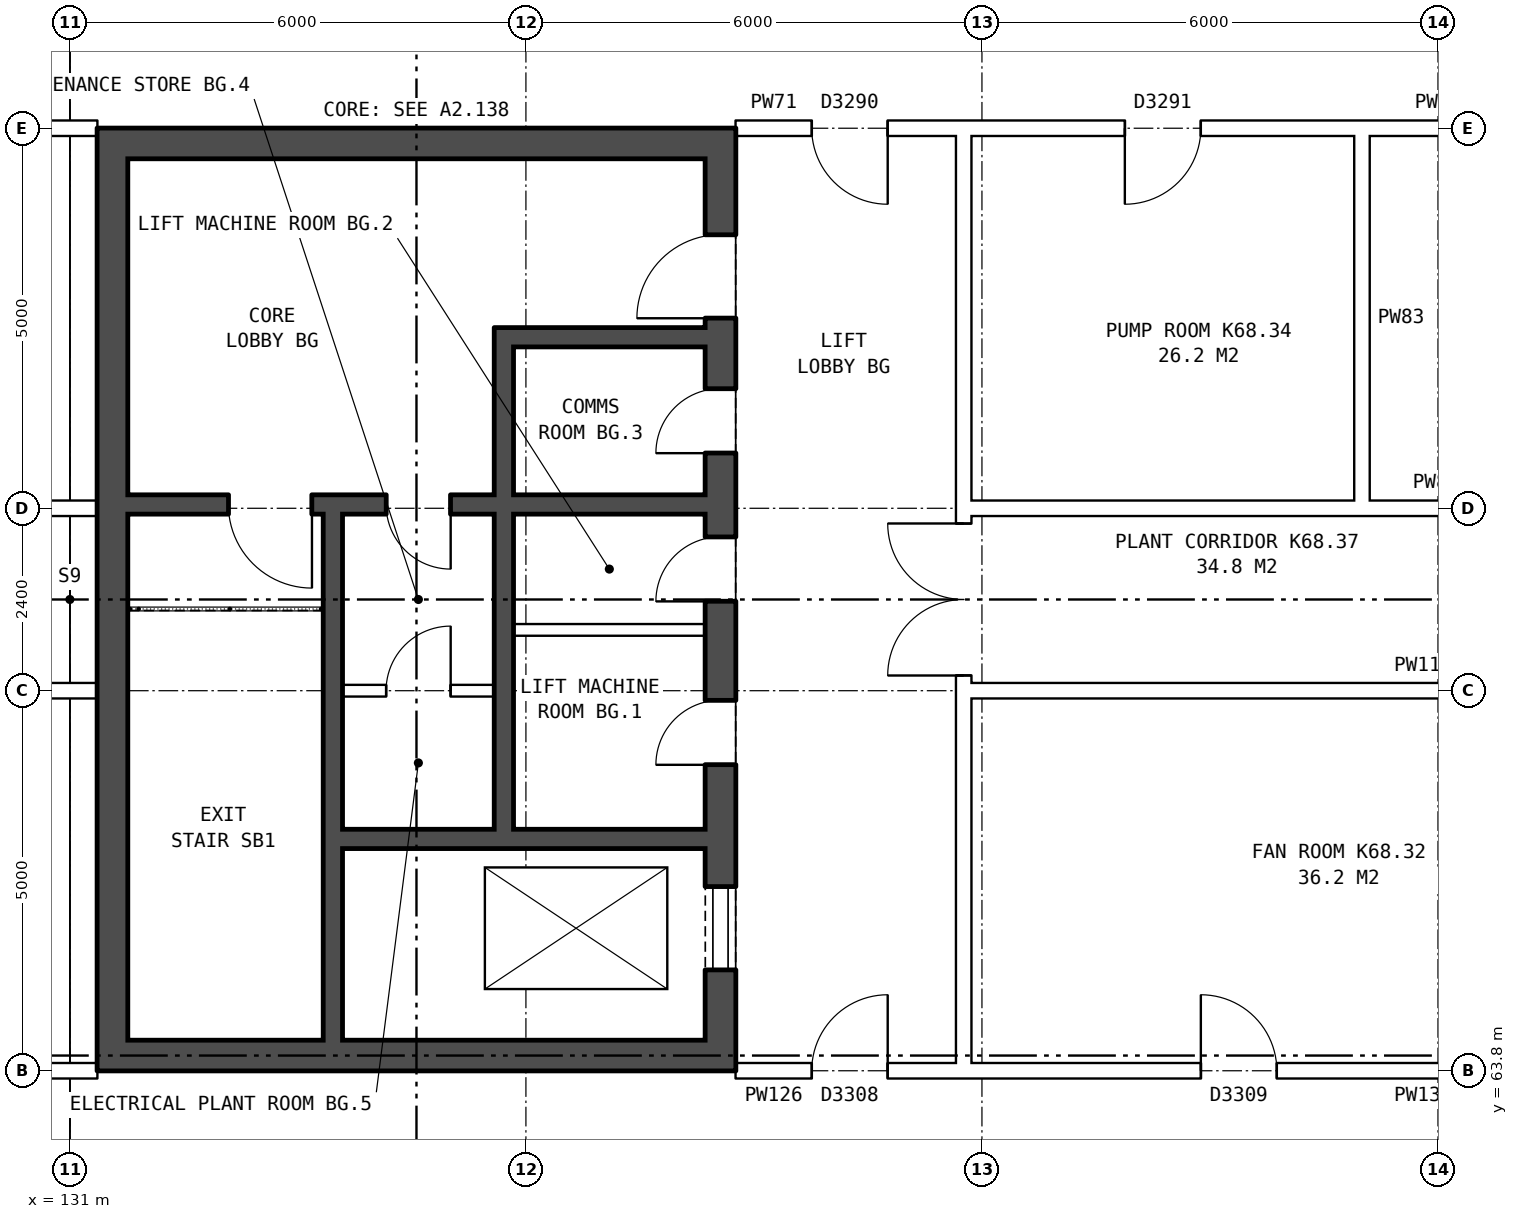
"""IFC4 building model, lengths in metres.
Left out: names, types, materials, properties, quantities, classifications, styles, units other than length and angle.
Written with IfcOpenShell. Run it as: python <this file> out.ifc"""

import sys

from ifc_helpers import new_model, si_unit, direction, frame, frame_2d, origin, place, context, subcontext, project, spatial, rectangle, extrude, element, fill, save


model = new_model("IFC4")
c1 = context("Model", 3, precision=1e-05, world=origin(), true_north=direction((0.0, 1.0)))
c2 = subcontext(c1, "Body", "Model", "MODEL_VIEW")
j1 = project(units=[si_unit("LENGTHUNIT", "METRE"), si_unit("PLANEANGLEUNIT", "RADIAN")], contexts=[c1])
p1 = place(None, origin())
s1 = spatial("IfcSite", under=j1, at=p1, CompositionType="ELEMENT")
p2 = place(p1, origin())
s2 = spatial("IfcBuilding", under=s1, at=p2, CompositionType="ELEMENT")
p3 = place(p2, frame((0.0, 0.0, 243.9)))
s3 = spatial("IfcBuildingStorey", under=s2, at=p3, CompositionType="ELEMENT", Elevation=243.9)
p4 = place(p3, frame((139.56, 63.8, 0.0), z_axis=(0.0, 0.0, 1.0), x_axis=(0.0, 1.0, 0.0)))
e1 = element("IfcWall", 1, at=p4, inside=s3, PredefinedType="SHEAR", context=c2, shape_type="SweptSolid", body=[
    extrude(rectangle(XDim=12.4, YDim=0.4, at=frame_2d((6.2, 0.0))), origin(), (0.0, 0.0, 1.0), 3.3),
])
p5 = place(p4, frame((1.325, 0.0, 0.0)))
e2 = element("IfcOpeningElement", 2, at=p5, cuts=e1, PredefinedType="OPENING", context=c2, shape_type="SweptSolid", body=[
    extrude(rectangle(XDim=1.1, YDim=2.1, at=frame_2d((0.55, 1.05))), frame((0.0, 0.21, 0.0), z_axis=(0.0, -1.0, 0.0), x_axis=(1.0, 0.0, 0.0)), (0.0, 0.0, 1.0), 0.42),
])
p6 = place(p4, frame((4.025, 0.0, 0.0)))
e3 = element("IfcOpeningElement", 3, at=p6, cuts=e1, PredefinedType="OPENING", context=c2, shape_type="SweptSolid", body=[
    extrude(rectangle(XDim=0.85, YDim=2.1, at=frame_2d((0.425, 1.05))), frame((0.0, 0.21, 0.0), z_axis=(0.0, -1.0, 0.0), x_axis=(1.0, 0.0, 0.0)), (0.0, 0.0, 1.0), 0.42),
])
p7 = place(p4, frame((6.175, 0.0, 0.0)))
e4 = element("IfcOpeningElement", 4, at=p7, cuts=e1, PredefinedType="OPENING", context=c2, shape_type="SweptSolid", body=[
    extrude(rectangle(XDim=0.85, YDim=2.1, at=frame_2d((0.425, 1.05))), frame((0.0, 0.21, 0.0), z_axis=(0.0, -1.0, 0.0), x_axis=(1.0, 0.0, 0.0)), (0.0, 0.0, 1.0), 0.42),
])
p8 = place(p4, frame((9.9, 0.0, 0.0)))
e5 = element("IfcOpeningElement", 5, at=p8, cuts=e1, PredefinedType="OPENING", context=c2, shape_type="SweptSolid", body=[
    extrude(rectangle(XDim=1.1, YDim=2.1, at=frame_2d((0.55, 1.05))), frame((0.0, 0.21, 0.0), z_axis=(0.0, -1.0, 0.0), x_axis=(1.0, 0.0, 0.0)), (0.0, 0.0, 1.0), 0.42),
])
p9 = place(p4, frame((8.125, 0.0, 0.0)))
e6 = element("IfcOpeningElement", 6, at=p9, cuts=e1, PredefinedType="OPENING", context=c2, shape_type="SweptSolid", body=[
    extrude(rectangle(XDim=0.85, YDim=2.1, at=frame_2d((0.425, 1.05))), frame((0.0, 0.21, 0.0), z_axis=(0.0, -1.0, 0.0), x_axis=(1.0, 0.0, 0.0)), (0.0, 0.0, 1.0), 0.42),
])
p10 = place(p3, frame((131.56, 63.8, 0.0), z_axis=(0.0, 0.0, 1.0), x_axis=(0.0, 1.0, 0.0)))
e7 = element("IfcWall", 7, at=p10, inside=s3, PredefinedType="SHEAR", context=c2, shape_type="SweptSolid", body=[
    extrude(rectangle(XDim=12.4, YDim=0.4, at=frame_2d((6.2, 0.0))), origin(), (0.0, 0.0, 1.0), 3.3),
])
for number, where, z_axis, x_axis in (
    (8, (139.36, 64.0, 0.0), (0.0, 0.0, 1.0), (-1.0, 0.0, 0.0)),
    (9, (139.36, 76.0, 0.0), (0.0, 0.0, 1.0), (-1.0, 0.0, 0.0)),
):
    element("IfcWall", number, at=place(p3, frame(where, z_axis=z_axis, x_axis=x_axis)), inside=s3, PredefinedType="SHEAR", context=c2, shape_type="SweptSolid", body=[
        extrude(rectangle(XDim=7.6, YDim=0.4, at=frame_2d((3.8, 0.0))), origin(), (0.0, 0.0, 1.0), 3.3),
    ])
p11 = place(p3, frame((139.36, 66.85, 0.0), z_axis=(0.0, 0.0, 1.0), x_axis=(-1.0, 0.0, 0.0)))
e10 = element("IfcWall", 10, at=p11, inside=s3, PredefinedType="SHEAR", context=c2, shape_type="SweptSolid", body=[
    extrude(rectangle(XDim=4.775, YDim=0.25, at=frame_2d((2.388, 0.0))), origin(), (0.0, 0.0, 1.0), 3.3),
])
p12 = place(p3, frame((136.585, 68.8, 0.0), z_axis=(0.0, 0.0, 1.0), x_axis=(-1.0, 0.0, 0.0)))
e11 = element("IfcWall", 11, at=p12, inside=s3, PredefinedType="PARTITIONING", context=c2, shape_type="SweptSolid", body=[
    extrude(rectangle(XDim=2.0, YDim=0.15, at=frame_2d((1.0, 0.0))), origin(), (0.0, 0.0, 1.0), 3.3),
])
p13 = place(p12, frame((0.575, 0.0, 0.0)))
e12 = element("IfcOpeningElement", 12, at=p13, cuts=e11, PredefinedType="OPENING", context=c2, shape_type="SweptSolid", body=[
    extrude(rectangle(XDim=0.85, YDim=2.1, at=frame_2d((0.425, 1.05))), frame((0.0, 0.085, 0.0), z_axis=(0.0, -1.0, 0.0), x_axis=(1.0, 0.0, 0.0)), (0.0, 0.0, 1.0), 0.17),
])
p14 = place(p3, frame((139.36, 69.6, 0.0), z_axis=(0.0, 0.0, 1.0), x_axis=(-1.0, 0.0, 0.0)))
e13 = element("IfcWall", 13, at=p14, inside=s3, PredefinedType="PARTITIONING", context=c2, shape_type="SweptSolid", body=[
    extrude(rectangle(XDim=2.525, YDim=0.15, at=frame_2d((1.263, 0.0))), origin(), (0.0, 0.0, 1.0), 3.3),
])
p15 = place(p3, frame((139.36, 71.25, 0.0), z_axis=(0.0, 0.0, 1.0), x_axis=(-1.0, 0.0, 0.0)))
e14 = element("IfcWall", 14, at=p15, inside=s3, PredefinedType="SHEAR", context=c2, shape_type="SweptSolid", body=[
    extrude(rectangle(XDim=7.6, YDim=0.25, at=frame_2d((3.8, 0.0))), origin(), (0.0, 0.0, 1.0), 3.3),
])
p16 = place(p15, frame((5.175, 0.0, 0.0)))
e15 = element("IfcOpeningElement", 15, at=p16, cuts=e14, PredefinedType="OPENING", context=c2, shape_type="SweptSolid", body=[
    extrude(rectangle(XDim=1.1, YDim=2.1, at=frame_2d((0.55, 1.05))), frame((0.0, 0.135, 0.0), z_axis=(0.0, -1.0, 0.0), x_axis=(1.0, 0.0, 0.0)), (0.0, 0.0, 1.0), 0.27),
])
p17 = place(p15, frame((3.35, 0.0, 0.0)))
e16 = element("IfcOpeningElement", 16, at=p17, cuts=e14, PredefinedType="OPENING", context=c2, shape_type="SweptSolid", body=[
    extrude(rectangle(XDim=0.85, YDim=2.1, at=frame_2d((0.425, 1.05))), frame((0.0, 0.135, 0.0), z_axis=(0.0, -1.0, 0.0), x_axis=(1.0, 0.0, 0.0)), (0.0, 0.0, 1.0), 0.27),
])
p18 = place(p3, frame((139.36, 73.45, 0.0), z_axis=(0.0, 0.0, 1.0), x_axis=(-1.0, 0.0, 0.0)))
e17 = element("IfcWall", 17, at=p18, inside=s3, PredefinedType="SHEAR", context=c2, shape_type="SweptSolid", body=[
    extrude(rectangle(XDim=2.525, YDim=0.25, at=frame_2d((1.263, 0.0))), origin(), (0.0, 0.0, 1.0), 3.3),
])
p19 = place(p3, frame((136.71, 66.975, 0.0), z_axis=(0.0, 0.0, 1.0), x_axis=(0.0, 1.0, 0.0)))
e18 = element("IfcWall", 18, at=p19, inside=s3, PredefinedType="SHEAR", context=c2, shape_type="SweptSolid", body=[
    extrude(rectangle(XDim=4.15, YDim=0.25, at=frame_2d((2.075, 0.0))), origin(), (0.0, 0.0, 1.0), 3.3),
])
p20 = place(p3, frame((136.71, 71.375, 0.0), z_axis=(0.0, 0.0, 1.0), x_axis=(0.0, 1.0, 0.0)))
e19 = element("IfcWall", 19, at=p20, inside=s3, PredefinedType="SHEAR", context=c2, shape_type="SweptSolid", body=[
    extrude(rectangle(XDim=2.2, YDim=0.25, at=frame_2d((1.1, 0.0))), origin(), (0.0, 0.0, 1.0), 3.3),
])
p21 = place(p3, frame((134.46, 64.2, 0.0), z_axis=(0.0, 0.0, 1.0), x_axis=(0.0, 1.0, 0.0)))
e20 = element("IfcWall", 20, at=p21, inside=s3, PredefinedType="SHEAR", context=c2, shape_type="SweptSolid", body=[
    extrude(rectangle(XDim=6.925, YDim=0.25, at=frame_2d((3.462, 0.0))), origin(), (0.0, 0.0, 1.0), 3.3),
])
p22 = place(p3, frame((142.76, 63.9, 0.0), z_axis=(0.0, 0.0, 1.0), x_axis=(0.0, 1.0, 0.0)))
e21 = element("IfcWall", 21, at=p22, inside=s3, PredefinedType="PARTITIONING", context=c2, shape_type="SweptSolid", body=[
    extrude(rectangle(XDim=12.2, YDim=0.2, at=frame_2d((6.1, 0.0))), origin(), (0.0, 0.0, 1.0), 3.3),
])
p23 = place(p22, frame((5.1, 0.0, 0.0)))
e22 = element("IfcOpeningElement", 22, at=p23, cuts=e21, PredefinedType="OPENING", context=c2, shape_type="SweptSolid", body=[
    extrude(rectangle(XDim=2.0, YDim=2.1, at=frame_2d((1.0, 1.05))), frame((0.0, 0.11, 0.0), z_axis=(0.0, -1.0, 0.0), x_axis=(1.0, 0.0, 0.0)), (0.0, 0.0, 1.0), 0.22),
])
p24 = place(p3, frame((104.7, 63.8, 0.0), z_axis=(0.0, 0.0, 1.0), x_axis=(1.0, 0.0, 0.0)))
e23 = element("IfcWall", 23, at=p24, inside=s3, PredefinedType="PARTITIONING", context=c2, shape_type="SweptSolid", body=[
    extrude(rectangle(XDim=26.66, YDim=0.2, at=frame_2d((13.33, 0.0))), origin(), (0.0, 0.0, 1.0), 3.3),
])
p25 = place(p3, frame((142.76, 63.8, 0.0), z_axis=(0.0, 0.0, 1.0), x_axis=(1.0, 0.0, 0.0)))
e24 = element("IfcWall", 24, at=p25, inside=s3, PredefinedType="PARTITIONING", context=c2, shape_type="SweptSolid", body=[
    extrude(rectangle(XDim=14.48, YDim=0.2, at=frame_2d((7.24, 0.0))), origin(), (0.0, 0.0, 1.0), 3.3),
])
p26 = place(p25, frame((3.12, 0.0, 0.0)))
e25 = element("IfcOpeningElement", 25, at=p26, cuts=e24, PredefinedType="OPENING", context=c2, shape_type="SweptSolid", body=[
    extrude(rectangle(XDim=1.0, YDim=2.1, at=frame_2d((0.5, 1.05))), frame((0.0, 0.11, 0.0), z_axis=(0.0, -1.0, 0.0), x_axis=(1.0, 0.0, 0.0)), (0.0, 0.0, 1.0), 0.22),
])
p27 = place(p25, frame((10.36, 0.0, 0.0)))
e26 = element("IfcOpeningElement", 26, at=p27, cuts=e24, PredefinedType="OPENING", context=c2, shape_type="SweptSolid", body=[
    extrude(rectangle(XDim=1.0, YDim=2.1, at=frame_2d((0.5, 1.05))), frame((0.0, 0.11, 0.0), z_axis=(0.0, -1.0, 0.0), x_axis=(1.0, 0.0, 0.0)), (0.0, 0.0, 1.0), 0.22),
])
p28 = place(p3, frame((139.76, 63.8, 0.0), z_axis=(0.0, 0.0, 1.0), x_axis=(1.0, 0.0, 0.0)))
e27 = element("IfcWall", 27, at=p28, inside=s3, PredefinedType="PARTITIONING", context=c2, shape_type="SweptSolid", body=[
    extrude(rectangle(XDim=3.0, YDim=0.2, at=frame_2d((1.5, 0.0))), origin(), (0.0, 0.0, 1.0), 3.3),
])
p29 = place(p28, frame((1.0, 0.0, 0.0)))
e28 = element("IfcOpeningElement", 28, at=p29, cuts=e27, PredefinedType="OPENING", context=c2, shape_type="SweptSolid", body=[
    extrude(rectangle(XDim=1.0, YDim=2.1, at=frame_2d((0.5, 1.05))), frame((0.0, 0.11, 0.0), z_axis=(0.0, -1.0, 0.0), x_axis=(1.0, 0.0, 0.0)), (0.0, 0.0, 1.0), 0.22),
])
p30 = place(p3, frame((104.7, 68.8, 0.0), z_axis=(0.0, 0.0, 1.0), x_axis=(1.0, 0.0, 0.0)))
e29 = element("IfcWall", 29, at=p30, inside=s3, PredefinedType="PARTITIONING", context=c2, shape_type="SweptSolid", body=[
    extrude(rectangle(XDim=26.66, YDim=0.2, at=frame_2d((13.33, 0.0))), origin(), (0.0, 0.0, 1.0), 3.3),
])
p31 = place(p30, frame((12.88, 0.0, 0.0)))
e30 = element("IfcOpeningElement", 30, at=p31, cuts=e29, PredefinedType="OPENING", context=c2, shape_type="SweptSolid", body=[
    extrude(rectangle(XDim=1.0, YDim=2.1, at=frame_2d((0.5, 1.05))), frame((0.0, 0.11, 0.0), z_axis=(0.0, -1.0, 0.0), x_axis=(1.0, 0.0, 0.0)), (0.0, 0.0, 1.0), 0.22),
])
p32 = place(p3, frame((142.76, 68.8, 0.0), z_axis=(0.0, 0.0, 1.0), x_axis=(1.0, 0.0, 0.0)))
e31 = element("IfcWall", 31, at=p32, inside=s3, PredefinedType="PARTITIONING", context=c2, shape_type="SweptSolid", body=[
    extrude(rectangle(XDim=14.48, YDim=0.2, at=frame_2d((7.24, 0.0))), origin(), (0.0, 0.0, 1.0), 3.3),
])
p33 = place(p3, frame((75.64, 71.2, 0.0), z_axis=(0.0, 0.0, 1.0), x_axis=(1.0, 0.0, 0.0)))
e32 = element("IfcWall", 32, at=p33, inside=s3, PredefinedType="PARTITIONING", context=c2, shape_type="SweptSolid", body=[
    extrude(rectangle(XDim=55.72, YDim=0.2, at=frame_2d((27.86, 0.0))), origin(), (0.0, 0.0, 1.0), 3.3),
])
p34 = place(p33, frame((6.555, 0.0, 0.0)))
e33 = element("IfcOpeningElement", 33, at=p34, cuts=e32, PredefinedType="OPENING", context=c2, shape_type="SweptSolid", body=[
    extrude(rectangle(XDim=1.0, YDim=2.1, at=frame_2d((0.5, 1.05))), frame((0.0, 0.11, 0.0), z_axis=(0.0, -1.0, 0.0), x_axis=(1.0, 0.0, 0.0)), (0.0, 0.0, 1.0), 0.22),
])
p35 = place(p33, frame((27.36, 0.0, 0.0)))
e34 = element("IfcOpeningElement", 34, at=p35, cuts=e32, PredefinedType="OPENING", context=c2, shape_type="SweptSolid", body=[
    extrude(rectangle(XDim=1.0, YDim=2.1, at=frame_2d((0.5, 1.05))), frame((0.0, 0.11, 0.0), z_axis=(0.0, -1.0, 0.0), x_axis=(1.0, 0.0, 0.0)), (0.0, 0.0, 1.0), 0.22),
])
p36 = place(p33, frame((48.165, 0.0, 0.0)))
e35 = element("IfcOpeningElement", 35, at=p36, cuts=e32, PredefinedType="OPENING", context=c2, shape_type="SweptSolid", body=[
    extrude(rectangle(XDim=1.0, YDim=2.1, at=frame_2d((0.5, 1.05))), frame((0.0, 0.11, 0.0), z_axis=(0.0, -1.0, 0.0), x_axis=(1.0, 0.0, 0.0)), (0.0, 0.0, 1.0), 0.22),
])
p37 = place(p3, frame((142.76, 71.2, 0.0), z_axis=(0.0, 0.0, 1.0), x_axis=(1.0, 0.0, 0.0)))
e36 = element("IfcWall", 36, at=p37, inside=s3, PredefinedType="PARTITIONING", context=c2, shape_type="SweptSolid", body=[
    extrude(rectangle(XDim=14.48, YDim=0.2, at=frame_2d((7.24, 0.0))), origin(), (0.0, 0.0, 1.0), 3.3),
])
p38 = place(p3, frame((75.64, 76.2, 0.0), z_axis=(0.0, 0.0, 1.0), x_axis=(1.0, 0.0, 0.0)))
e37 = element("IfcWall", 37, at=p38, inside=s3, PredefinedType="PARTITIONING", context=c2, shape_type="SweptSolid", body=[
    extrude(rectangle(XDim=55.72, YDim=0.2, at=frame_2d((27.86, 0.0))), origin(), (0.0, 0.0, 1.0), 3.3),
])
p39 = place(p3, frame((142.76, 76.2, 0.0), z_axis=(0.0, 0.0, 1.0), x_axis=(1.0, 0.0, 0.0)))
e38 = element("IfcWall", 38, at=p39, inside=s3, PredefinedType="PARTITIONING", context=c2, shape_type="SweptSolid", body=[
    extrude(rectangle(XDim=14.48, YDim=0.2, at=frame_2d((7.24, 0.0))), origin(), (0.0, 0.0, 1.0), 3.3),
])
p40 = place(p39, frame((2.12, 0.0, 0.0)))
e39 = element("IfcOpeningElement", 39, at=p40, cuts=e38, PredefinedType="OPENING", context=c2, shape_type="SweptSolid", body=[
    extrude(rectangle(XDim=1.0, YDim=2.1, at=frame_2d((0.5, 1.05))), frame((0.0, 0.11, 0.0), z_axis=(0.0, -1.0, 0.0), x_axis=(1.0, 0.0, 0.0)), (0.0, 0.0, 1.0), 0.22),
])
p41 = place(p39, frame((9.36, 0.0, 0.0)))
e40 = element("IfcOpeningElement", 40, at=p41, cuts=e38, PredefinedType="OPENING", context=c2, shape_type="SweptSolid", body=[
    extrude(rectangle(XDim=1.0, YDim=2.1, at=frame_2d((0.5, 1.05))), frame((0.0, 0.11, 0.0), z_axis=(0.0, -1.0, 0.0), x_axis=(1.0, 0.0, 0.0)), (0.0, 0.0, 1.0), 0.22),
])
p42 = place(p3, frame((139.76, 76.2, 0.0), z_axis=(0.0, 0.0, 1.0), x_axis=(1.0, 0.0, 0.0)))
e41 = element("IfcWall", 41, at=p42, inside=s3, PredefinedType="PARTITIONING", context=c2, shape_type="SweptSolid", body=[
    extrude(rectangle(XDim=3.0, YDim=0.2, at=frame_2d((1.5, 0.0))), origin(), (0.0, 0.0, 1.0), 3.3),
])
p43 = place(p42, frame((1.0, 0.0, 0.0)))
e42 = element("IfcOpeningElement", 42, at=p43, cuts=e41, PredefinedType="OPENING", context=c2, shape_type="SweptSolid", body=[
    extrude(rectangle(XDim=1.0, YDim=2.1, at=frame_2d((0.5, 1.05))), frame((0.0, 0.11, 0.0), z_axis=(0.0, -1.0, 0.0), x_axis=(1.0, 0.0, 0.0)), (0.0, 0.0, 1.0), 0.22),
])
p44 = place(p3, frame((148.0, 71.1, 0.0), z_axis=(0.0, 0.0, 1.0), x_axis=(0.0, 1.0, 0.0)))
e43 = element("IfcWall", 43, at=p44, inside=s3, PredefinedType="PARTITIONING", context=c2, shape_type="SweptSolid", body=[
    extrude(rectangle(XDim=5.2, YDim=0.2, at=frame_2d((2.6, 0.0))), origin(), (0.0, 0.0, 1.0), 3.3),
])
p45 = place(p5, origin())
e44 = element("IfcDoor", 44, at=p45, inside=s3, OperationType="DOUBLE_DOOR_SLIDING", PredefinedType="DOOR", context=c2, shape_type="SweptSolid", body=[
    extrude(rectangle(XDim=1.1, YDim=2.1, at=frame_2d((0.55, 1.05))), frame((0.0, 0.185, 0.0), z_axis=(0.0, -1.0, 0.0), x_axis=(1.0, 0.0, 0.0)), (0.0, 0.0, 1.0), 0.05),
])
fill(e2, e44)
p46 = place(p6, origin())
e45 = element("IfcDoor", 45, at=p46, inside=s3, OperationType="SINGLE_SWING_LEFT", PredefinedType="DOOR", context=c2, shape_type="SweptSolid", body=[
    extrude(rectangle(XDim=0.85, YDim=2.1, at=frame_2d((0.425, 1.05))), frame((0.0, 0.185, 0.0), z_axis=(0.0, -1.0, 0.0), x_axis=(1.0, 0.0, 0.0)), (0.0, 0.0, 1.0), 0.05),
])
fill(e3, e45)
p47 = place(p7, origin())
e46 = element("IfcDoor", 46, at=p47, inside=s3, OperationType="SINGLE_SWING_LEFT", PredefinedType="DOOR", context=c2, shape_type="SweptSolid", body=[
    extrude(rectangle(XDim=0.85, YDim=2.1, at=frame_2d((0.425, 1.05))), frame((0.0, 0.185, 0.0), z_axis=(0.0, -1.0, 0.0), x_axis=(1.0, 0.0, 0.0)), (0.0, 0.0, 1.0), 0.05),
])
fill(e4, e46)
p48 = place(p8, origin())
e47 = element("IfcDoor", 47, at=p48, inside=s3, OperationType="SINGLE_SWING_LEFT", PredefinedType="DOOR", context=c2, shape_type="SweptSolid", body=[
    extrude(rectangle(XDim=1.1, YDim=2.1, at=frame_2d((0.55, 1.05))), frame((0.0, 0.185, 0.0), z_axis=(0.0, -1.0, 0.0), x_axis=(1.0, 0.0, 0.0)), (0.0, 0.0, 1.0), 0.05),
])
fill(e5, e47)
p49 = place(p16, origin())
e48 = element("IfcDoor", 48, at=p49, inside=s3, OperationType="SINGLE_SWING_LEFT", PredefinedType="DOOR", context=c2, shape_type="SweptSolid", body=[
    extrude(rectangle(XDim=1.1, YDim=2.1, at=frame_2d((0.55, 1.05))), frame((0.0, 0.025, 0.0), z_axis=(0.0, -1.0, 0.0), x_axis=(1.0, 0.0, 0.0)), (0.0, 0.0, 1.0), 0.05),
])
fill(e15, e48)
p50 = place(p9, origin())
e49 = element("IfcDoor", 49, at=p50, inside=s3, OperationType="SINGLE_SWING_LEFT", PredefinedType="DOOR", context=c2, shape_type="SweptSolid", body=[
    extrude(rectangle(XDim=0.85, YDim=2.1, at=frame_2d((0.425, 1.05))), frame((0.0, 0.185, 0.0), z_axis=(0.0, -1.0, 0.0), x_axis=(1.0, 0.0, 0.0)), (0.0, 0.0, 1.0), 0.05),
])
fill(e6, e49)
p51 = place(p17, origin())
e50 = element("IfcDoor", 50, at=p51, inside=s3, OperationType="SINGLE_SWING_LEFT", PredefinedType="DOOR", context=c2, shape_type="SweptSolid", body=[
    extrude(rectangle(XDim=0.85, YDim=2.1, at=frame_2d((0.425, 1.05))), frame((0.0, 0.025, 0.0), z_axis=(0.0, -1.0, 0.0), x_axis=(1.0, 0.0, 0.0)), (0.0, 0.0, 1.0), 0.05),
])
fill(e16, e50)
p52 = place(p13, frame((0.85, 0.0, 0.0), z_axis=(0.0, 0.0, 1.0), x_axis=(-1.0, 0.0, 0.0)))
e51 = element("IfcDoor", 51, at=p52, inside=s3, OperationType="SINGLE_SWING_RIGHT", PredefinedType="DOOR", context=c2, shape_type="SweptSolid", body=[
    extrude(rectangle(XDim=0.85, YDim=2.1, at=frame_2d((0.425, 1.05))), frame((0.0, 0.025, 0.0), z_axis=(0.0, -1.0, 0.0), x_axis=(1.0, 0.0, 0.0)), (0.0, 0.0, 1.0), 0.05),
])
fill(e12, e51)
p53 = place(p23, origin())
e52 = element("IfcDoor", 52, at=p53, inside=s3, OperationType="DOUBLE_DOOR_SINGLE_SWING", PredefinedType="DOOR", context=c2, shape_type="SweptSolid", body=[
    extrude(rectangle(XDim=2.0, YDim=2.1, at=frame_2d((1.0, 1.05))), frame((0.0, 0.025, 0.0), z_axis=(0.0, -1.0, 0.0), x_axis=(1.0, 0.0, 0.0)), (0.0, 0.0, 1.0), 0.05),
])
fill(e22, e52)
p54 = place(p26, origin())
e53 = element("IfcDoor", 53, at=p54, inside=s3, OperationType="SINGLE_SWING_LEFT", PredefinedType="DOOR", context=c2, shape_type="SweptSolid", body=[
    extrude(rectangle(XDim=1.0, YDim=2.1, at=frame_2d((0.5, 1.05))), frame((0.0, 0.025, 0.0), z_axis=(0.0, -1.0, 0.0), x_axis=(1.0, 0.0, 0.0)), (0.0, 0.0, 1.0), 0.05),
])
fill(e25, e53)
p55 = place(p29, origin())
e54 = element("IfcDoor", 54, at=p55, inside=s3, OperationType="SINGLE_SWING_RIGHT", PredefinedType="DOOR", context=c2, shape_type="SweptSolid", body=[
    extrude(rectangle(XDim=1.0, YDim=2.1, at=frame_2d((0.5, 1.05))), frame((0.0, 0.025, 0.0), z_axis=(0.0, -1.0, 0.0), x_axis=(1.0, 0.0, 0.0)), (0.0, 0.0, 1.0), 0.05),
])
fill(e28, e54)
p56 = place(p40, frame((1.0, 0.0, 0.0), z_axis=(0.0, 0.0, 1.0), x_axis=(-1.0, 0.0, 0.0)))
e55 = element("IfcDoor", 55, at=p56, inside=s3, OperationType="SINGLE_SWING_RIGHT", PredefinedType="DOOR", context=c2, shape_type="SweptSolid", body=[
    extrude(rectangle(XDim=1.0, YDim=2.1, at=frame_2d((0.5, 1.05))), frame((0.0, 0.025, 0.0), z_axis=(0.0, -1.0, 0.0), x_axis=(1.0, 0.0, 0.0)), (0.0, 0.0, 1.0), 0.05),
])
fill(e39, e55)
p57 = place(p43, frame((1.0, 0.0, 0.0), z_axis=(0.0, 0.0, 1.0), x_axis=(-1.0, 0.0, 0.0)))
e56 = element("IfcDoor", 56, at=p57, inside=s3, OperationType="SINGLE_SWING_LEFT", PredefinedType="DOOR", context=c2, shape_type="SweptSolid", body=[
    extrude(rectangle(XDim=1.0, YDim=2.1, at=frame_2d((0.5, 1.05))), frame((0.0, 0.025, 0.0), z_axis=(0.0, -1.0, 0.0), x_axis=(1.0, 0.0, 0.0)), (0.0, 0.0, 1.0), 0.05),
])
fill(e42, e56)
save(model, sys.argv[1])
